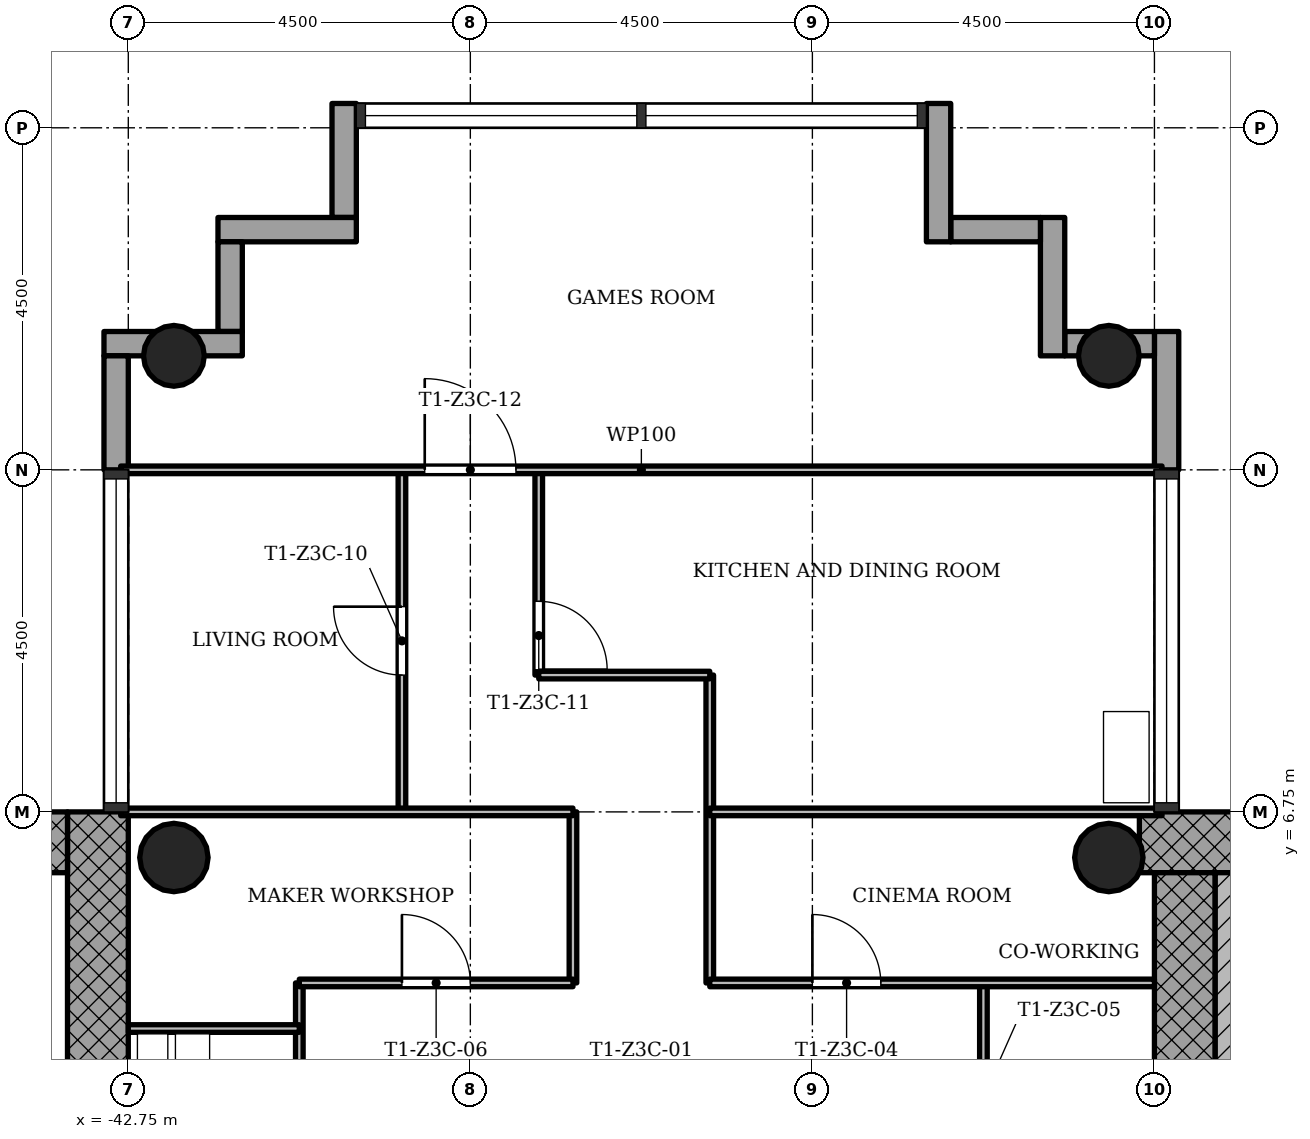
"""IFC4 building model, lengths in metres.
Left out: names, types, materials, properties, quantities, classifications, styles, units other than length and angle.
Written with IfcOpenShell. Run it as: python <this file> out.ifc"""

import sys

from ifc_helpers import new_model, si_unit, direction, frame, frame_2d, origin, origin_2d, place, context, subcontext, project, spatial, rectangle, hollow_circle, extrude, element, fill, save


model = new_model("IFC4")
c1 = context("Model", 3, precision=1e-05, world=origin(), true_north=direction((0.0, 1.0)))
c2 = subcontext(c1, "Body", "Model", "MODEL_VIEW")
j1 = project(units=[si_unit("LENGTHUNIT", "METRE"), si_unit("PLANEANGLEUNIT", "RADIAN")], contexts=[c1])
p1 = place(None, origin())
s1 = spatial("IfcSite", under=j1, at=p1, CompositionType="ELEMENT")
p2 = place(p1, origin())
s2 = spatial("IfcBuilding", under=s1, at=p2, CompositionType="ELEMENT")
p3 = place(p2, frame((0.0, 0.0, 160.9)))
s3 = spatial("IfcBuildingStorey", under=s2, at=p3, CompositionType="ELEMENT", Elevation=160.9)
p4 = place(p3, frame((-20.652, 6.35, 0.0), z_axis=(0.0, 0.0, 1.0), x_axis=(-1.0, 0.0, 0.0)))
e1 = element("IfcWall", 1, at=p4, inside=s3, PredefinedType="SHEAR", context=c2, shape_type="SweptSolid", body=[
    extrude(rectangle(XDim=8.796, YDim=0.8, at=frame_2d((4.398, 0.0))), origin(), (0.0, 0.0, 1.0), 3.4),
])
p5 = place(p3, frame((-28.85, 5.95, 0.0), z_axis=(0.0, 0.0, 1.0), x_axis=(0.0, -1.0, 0.0)))
e2 = element("IfcWall", 2, at=p5, inside=s3, PredefinedType="SHEAR", context=c2, shape_type="SweptSolid", body=[
    extrude(rectangle(XDim=12.7, YDim=0.8, at=frame_2d((6.35, 0.0))), origin(), (0.0, 0.0, 1.0), 3.4),
])
p6 = place(p5, frame((5.05, 0.0, 0.0)))
e3 = element("IfcOpeningElement", 3, at=p6, cuts=e2, PredefinedType="OPENING", context=c2, shape_type="SweptSolid", body=[
    extrude(rectangle(XDim=1.8, YDim=2.1, at=frame_2d((0.9, 1.05))), frame((0.0, 0.41, 0.0), z_axis=(0.0, -1.0, 0.0), x_axis=(1.0, 0.0, 0.0)), (0.0, 0.0, 1.0), 0.82),
])
p7 = place(p3, frame((-43.15, -5.95, 0.0), z_axis=(0.0, 0.0, 1.0), x_axis=(0.0, 1.0, 0.0)))
e4 = element("IfcWall", 4, at=p7, inside=s3, PredefinedType="SHEAR", context=c2, shape_type="SweptSolid", body=[
    extrude(rectangle(XDim=12.7, YDim=0.8, at=frame_2d((6.35, 0.0))), origin(), (0.0, 0.0, 1.0), 3.4),
])
p8 = place(p7, frame((5.05, 0.0, 0.0)))
e5 = element("IfcOpeningElement", 5, at=p8, cuts=e4, PredefinedType="OPENING", context=c2, shape_type="SweptSolid", body=[
    extrude(rectangle(XDim=1.8, YDim=2.1, at=frame_2d((0.9, 1.05))), frame((0.0, 0.41, 0.0), z_axis=(0.0, -1.0, 0.0), x_axis=(1.0, 0.0, 0.0)), (0.0, 0.0, 1.0), 0.82),
])
p9 = place(p3, frame((-43.55, 6.35, 0.0), z_axis=(0.0, 0.0, 1.0), x_axis=(-1.0, 0.0, 0.0)))
e6 = element("IfcWall", 6, at=p9, inside=s3, PredefinedType="SHEAR", context=c2, shape_type="SweptSolid", body=[
    extrude(rectangle(XDim=8.2, YDim=0.8, at=frame_2d((4.1, 0.0))), origin(), (0.0, 0.0, 1.0), 3.4),
])
for number, where, z_axis, x_axis in (
    (7, (-29.85, 12.75, 0.0), (0.0, 0.0, 1.0), (1.0, 0.0, 0.0)),
    (8, (-42.15, 12.75, 0.0), (0.0, 0.0, 1.0), (1.0, 0.0, 0.0)),
):
    element("IfcColumn", number, at=place(p3, frame(where, z_axis=z_axis, x_axis=x_axis)), inside=s3, PredefinedType="COLUMN", context=c2, shape_type="SweptSolid", body=[
        extrude(hollow_circle(Radius=0.4, WallThickness=0.028, at=origin_2d()), origin(), (0.0, 0.0, 1.0), 3.4),
    ])
for number, where, z_axis, x_axis in (
    (9, (-29.85, 6.15, 0.0), (0.0, 0.0, 1.0), (1.0, 0.0, 0.0)),
    (10, (-42.15, 6.15, 0.0), (0.0, 0.0, 1.0), (1.0, 0.0, 0.0)),
):
    element("IfcColumn", number, at=place(p3, frame(where, z_axis=z_axis, x_axis=x_axis)), inside=s3, PredefinedType="COLUMN", context=c2, shape_type="SweptSolid", body=[
        extrude(hollow_circle(Radius=0.45, WallThickness=0.032, at=origin_2d()), origin(), (0.0, 0.0, 1.0), 3.4),
    ])
p10 = place(p3, frame((-29.09, 11.25, -0.3), z_axis=(0.0, 0.0, 1.0), x_axis=(0.0, 1.0, 0.0)))
e11 = element("IfcWall", 11, at=p10, inside=s3, PredefinedType="STANDARD", context=c2, shape_type="SweptSolid", body=[
    extrude(rectangle(XDim=1.82, YDim=0.32, at=frame_2d((0.91, 0.0))), origin(), (0.0, 0.0, 1.0), 3.4),
])
p11 = place(p3, frame((-29.25, 12.91, -0.3), z_axis=(0.0, 0.0, 1.0), x_axis=(-1.0, 0.0, 0.0)))
e12 = element("IfcWall", 12, at=p11, inside=s3, PredefinedType="STANDARD", context=c2, shape_type="SweptSolid", body=[
    extrude(rectangle(XDim=1.18, YDim=0.32, at=frame_2d((0.59, 0.0))), origin(), (0.0, 0.0, 1.0), 3.4),
])
p12 = place(p3, frame((-30.59, 12.75, -0.3), z_axis=(0.0, 0.0, 1.0), x_axis=(0.0, 1.0, 0.0)))
e13 = element("IfcWall", 13, at=p12, inside=s3, PredefinedType="STANDARD", context=c2, shape_type="SweptSolid", body=[
    extrude(rectangle(XDim=1.82, YDim=0.32, at=frame_2d((0.91, 0.0))), origin(), (0.0, 0.0, 1.0), 3.4),
])
p13 = place(p3, frame((-30.75, 14.41, -0.3), z_axis=(0.0, 0.0, 1.0), x_axis=(-1.0, 0.0, 0.0)))
e14 = element("IfcWall", 14, at=p13, inside=s3, PredefinedType="STANDARD", context=c2, shape_type="SweptSolid", body=[
    extrude(rectangle(XDim=1.18, YDim=0.32, at=frame_2d((0.59, 0.0))), origin(), (0.0, 0.0, 1.0), 3.4),
])
p14 = place(p3, frame((-32.09, 14.25, -0.3), z_axis=(0.0, 0.0, 1.0), x_axis=(0.0, 1.0, 0.0)))
e15 = element("IfcWall", 15, at=p14, inside=s3, PredefinedType="STANDARD", context=c2, shape_type="SweptSolid", body=[
    extrude(rectangle(XDim=1.82, YDim=0.32, at=frame_2d((0.91, 0.0))), origin(), (0.0, 0.0, 1.0), 3.4),
])
p15 = place(p3, frame((-39.91, 16.07, -0.3), z_axis=(0.0, 0.0, 1.0), x_axis=(0.0, -1.0, 0.0)))
e16 = element("IfcWall", 16, at=p15, inside=s3, PredefinedType="STANDARD", context=c2, shape_type="SweptSolid", body=[
    extrude(rectangle(XDim=1.5, YDim=0.32, at=frame_2d((0.75, 0.0))), origin(), (0.0, 0.0, 1.0), 3.4),
])
p16 = place(p3, frame((-39.75, 14.41, -0.3), z_axis=(0.0, 0.0, 1.0), x_axis=(-1.0, 0.0, 0.0)))
e17 = element("IfcWall", 17, at=p16, inside=s3, PredefinedType="STANDARD", context=c2, shape_type="SweptSolid", body=[
    extrude(rectangle(XDim=1.82, YDim=0.32, at=frame_2d((0.91, 0.0))), origin(), (0.0, 0.0, 1.0), 3.4),
])
p17 = place(p3, frame((-41.41, 14.25, -0.3), z_axis=(0.0, 0.0, 1.0), x_axis=(0.0, -1.0, 0.0)))
e18 = element("IfcWall", 18, at=p17, inside=s3, PredefinedType="STANDARD", context=c2, shape_type="SweptSolid", body=[
    extrude(rectangle(XDim=1.18, YDim=0.32, at=frame_2d((0.59, 0.0))), origin(), (0.0, 0.0, 1.0), 3.4),
])
p18 = place(p3, frame((-41.25, 12.91, -0.3), z_axis=(0.0, 0.0, 1.0), x_axis=(-1.0, 0.0, 0.0)))
e19 = element("IfcWall", 19, at=p18, inside=s3, PredefinedType="STANDARD", context=c2, shape_type="SweptSolid", body=[
    extrude(rectangle(XDim=1.82, YDim=0.32, at=frame_2d((0.91, 0.0))), origin(), (0.0, 0.0, 1.0), 3.4),
])
p19 = place(p3, frame((-42.91, 12.75, -0.3), z_axis=(0.0, 0.0, 1.0), x_axis=(0.0, -1.0, 0.0)))
e20 = element("IfcWall", 20, at=p19, inside=s3, PredefinedType="STANDARD", context=c2, shape_type="SweptSolid", body=[
    extrude(rectangle(XDim=1.5, YDim=0.32, at=frame_2d((0.75, 0.0))), origin(), (0.0, 0.0, 1.0), 3.4),
])
p20 = place(p3, frame((-40.5, 1.5, 0.0), z_axis=(0.0, 0.0, 1.0), x_axis=(0.0, 1.0, 0.0)))
e21 = element("IfcWall", 21, at=p20, inside=s3, PredefinedType="PARTITIONING", context=c2, shape_type="SweptSolid", body=[
    extrude(rectangle(XDim=3.0, YDim=0.1, at=frame_2d((1.5, 0.0))), origin(), (0.0, 0.0, 1.0), 3.0),
])
p21 = place(p3, frame((-39.15, 6.75, 0.0), z_axis=(0.0, 0.0, 1.0), x_axis=(0.0, 1.0, 0.0)))
e22 = element("IfcWall", 22, at=p21, inside=s3, PredefinedType="PARTITIONING", context=c2, shape_type="SweptSolid", body=[
    extrude(rectangle(XDim=4.5, YDim=0.1, at=frame_2d((2.25, 0.0))), origin(), (0.0, 0.0, 1.0), 3.0),
])
p22 = place(p21, frame((1.8, 0.0, 0.0)))
e23 = element("IfcOpeningElement", 23, at=p22, cuts=e22, PredefinedType="OPENING", context=c2, shape_type="SweptSolid", body=[
    extrude(rectangle(XDim=0.9, YDim=2.1, at=frame_2d((0.45, 1.05))), frame((0.0, 0.06, 0.0), z_axis=(0.0, -1.0, 0.0), x_axis=(1.0, 0.0, 0.0)), (0.0, 0.0, 1.0), 0.12),
])
p23 = place(p3, frame((-37.35, 8.55, 0.0), z_axis=(0.0, 0.0, 1.0), x_axis=(0.0, 1.0, 0.0)))
e24 = element("IfcWall", 24, at=p23, inside=s3, PredefinedType="PARTITIONING", context=c2, shape_type="SweptSolid", body=[
    extrude(rectangle(XDim=2.7, YDim=0.1, at=frame_2d((1.35, 0.0))), origin(), (0.0, 0.0, 1.0), 3.0),
])
p24 = place(p23, frame((0.07, 0.0, 0.0)))
e25 = element("IfcOpeningElement", 25, at=p24, cuts=e24, PredefinedType="OPENING", context=c2, shape_type="SweptSolid", body=[
    extrude(rectangle(XDim=0.9, YDim=2.1, at=frame_2d((0.45, 1.05))), frame((0.0, 0.06, 0.0), z_axis=(0.0, -1.0, 0.0), x_axis=(1.0, 0.0, 0.0)), (0.0, 0.0, 1.0), 0.12),
])
p25 = place(p3, frame((-36.9, 4.5, 0.0), z_axis=(0.0, 0.0, 1.0), x_axis=(0.0, 1.0, 0.0)))
e26 = element("IfcWall", 26, at=p25, inside=s3, PredefinedType="PARTITIONING", context=c2, shape_type="SweptSolid", body=[
    extrude(rectangle(XDim=2.25, YDim=0.1, at=frame_2d((1.125, 0.0))), origin(), (0.0, 0.0, 1.0), 3.0),
])
p26 = place(p3, frame((-35.1, 4.5, 0.0), z_axis=(0.0, 0.0, 1.0), x_axis=(0.0, 1.0, 0.0)))
e27 = element("IfcWall", 27, at=p26, inside=s3, PredefinedType="PARTITIONING", context=c2, shape_type="SweptSolid", body=[
    extrude(rectangle(XDim=4.05, YDim=0.1, at=frame_2d((2.025, 0.0))), origin(), (0.0, 0.0, 1.0), 3.0),
])
p27 = place(p3, frame((-31.5, 1.5, 0.0), z_axis=(0.0, 0.0, 1.0), x_axis=(0.0, 1.0, 0.0)))
e28 = element("IfcWall", 28, at=p27, inside=s3, PredefinedType="PARTITIONING", context=c2, shape_type="SweptSolid", body=[
    extrude(rectangle(XDim=3.0, YDim=0.1, at=frame_2d((1.5, 0.0))), origin(), (0.0, 0.0, 1.0), 3.0),
])
p28 = place(p27, frame((1.05, 0.0, 0.0)))
e29 = element("IfcOpeningElement", 29, at=p28, cuts=e28, PredefinedType="OPENING", context=c2, shape_type="SweptSolid", body=[
    extrude(rectangle(XDim=0.9, YDim=2.1, at=frame_2d((0.45, 1.05))), frame((0.0, 0.06, 0.0), z_axis=(0.0, -1.0, 0.0), x_axis=(1.0, 0.0, 0.0)), (0.0, 0.0, 1.0), 0.12),
])
p29 = place(p3, frame((-42.75, 3.9, 0.0), z_axis=(0.0, 0.0, 1.0), x_axis=(1.0, 0.0, 0.0)))
e30 = element("IfcWall", 30, at=p29, inside=s3, PredefinedType="PARTITIONING", context=c2, shape_type="SweptSolid", body=[
    extrude(rectangle(XDim=2.25, YDim=0.1, at=frame_2d((1.125, 0.0))), origin(), (0.0, 0.0, 1.0), 3.0),
])
p30 = place(p3, frame((-40.5, 4.5, 0.0), z_axis=(0.0, 0.0, 1.0), x_axis=(1.0, 0.0, 0.0)))
e31 = element("IfcWall", 31, at=p30, inside=s3, PredefinedType="PARTITIONING", context=c2, shape_type="SweptSolid", body=[
    extrude(rectangle(XDim=3.6, YDim=0.1, at=frame_2d((1.8, 0.0))), origin(), (0.0, 0.0, 1.0), 3.0),
])
p31 = place(p30, frame((1.35, 0.0, 0.0)))
e32 = element("IfcOpeningElement", 32, at=p31, cuts=e31, PredefinedType="OPENING", context=c2, shape_type="SweptSolid", body=[
    extrude(rectangle(XDim=0.9, YDim=2.1, at=frame_2d((0.45, 1.05))), frame((0.0, 0.06, 0.0), z_axis=(0.0, -1.0, 0.0), x_axis=(1.0, 0.0, 0.0)), (0.0, 0.0, 1.0), 0.12),
])
p32 = place(p3, frame((-35.1, 4.5, 0.0), z_axis=(0.0, 0.0, 1.0), x_axis=(1.0, 0.0, 0.0)))
e33 = element("IfcWall", 33, at=p32, inside=s3, PredefinedType="PARTITIONING", context=c2, shape_type="SweptSolid", body=[
    extrude(rectangle(XDim=5.85, YDim=0.1, at=frame_2d((2.925, 0.0))), origin(), (0.0, 0.0, 1.0), 3.0),
])
p33 = place(p32, frame((1.35, 0.0, 0.0)))
e34 = element("IfcOpeningElement", 34, at=p33, cuts=e33, PredefinedType="OPENING", context=c2, shape_type="SweptSolid", body=[
    extrude(rectangle(XDim=0.9, YDim=2.1, at=frame_2d((0.45, 1.05))), frame((0.0, 0.06, 0.0), z_axis=(0.0, -1.0, 0.0), x_axis=(1.0, 0.0, 0.0)), (0.0, 0.0, 1.0), 0.12),
])
for number, where, z_axis, x_axis in (
    (35, (-42.85, 6.75, 0.0), (0.0, 0.0, 1.0), (1.0, 0.0, 0.0)),
    (36, (-35.1, 6.75, 0.0), (0.0, 0.0, 1.0), (1.0, 0.0, 0.0)),
):
    element("IfcWall", number, at=place(p3, frame(where, z_axis=z_axis, x_axis=x_axis)), inside=s3, PredefinedType="PARTITIONING", context=c2, shape_type="SweptSolid", body=[
        extrude(rectangle(XDim=5.95, YDim=0.1, at=frame_2d((2.975, 0.0))), origin(), (0.0, 0.0, 1.0), 3.0),
    ])
p34 = place(p3, frame((-37.35, 8.55, 0.0), z_axis=(0.0, 0.0, 1.0), x_axis=(1.0, 0.0, 0.0)))
e37 = element("IfcWall", 37, at=p34, inside=s3, PredefinedType="PARTITIONING", context=c2, shape_type="SweptSolid", body=[
    extrude(rectangle(XDim=2.25, YDim=0.1, at=frame_2d((1.125, 0.0))), origin(), (0.0, 0.0, 1.0), 3.0),
])
p35 = place(p3, frame((-42.85, 11.25, 0.0), z_axis=(0.0, 0.0, 1.0), x_axis=(1.0, 0.0, 0.0)))
e38 = element("IfcWall", 38, at=p35, inside=s3, PredefinedType="PARTITIONING", context=c2, shape_type="SweptSolid", body=[
    extrude(rectangle(XDim=13.7, YDim=0.1, at=frame_2d((6.85, 0.0))), origin(), (0.0, 0.0, 1.0), 3.0),
])
p36 = place(p35, frame((4.0, 0.0, 0.0)))
e39 = element("IfcOpeningElement", 39, at=p36, cuts=e38, PredefinedType="OPENING", context=c2, shape_type="SweptSolid", body=[
    extrude(rectangle(XDim=1.2, YDim=2.1, at=frame_2d((0.6, 1.05))), frame((0.0, 0.06, 0.0), z_axis=(0.0, -1.0, 0.0), x_axis=(1.0, 0.0, 0.0)), (0.0, 0.0, 1.0), 0.12),
])
p37 = place(p3, frame((-28.25, 1.85, 0.0), z_axis=(0.0, 0.0, 1.0), x_axis=(0.0, 1.0, 0.0)))
e40 = element("IfcWall", 40, at=p37, inside=s3, PredefinedType="SHEAR", context=c2, shape_type="SweptSolid", body=[
    extrude(rectangle(XDim=4.1, YDim=0.4, at=frame_2d((2.05, 0.0))), origin(), (0.0, 0.0, 1.0), 3.4),
])
p38 = place(p33, origin())
e41 = element("IfcDoor", 41, at=p38, inside=s3, OperationType="SINGLE_SWING_RIGHT", PredefinedType="DOOR", context=c2, shape_type="SweptSolid", body=[
    extrude(rectangle(XDim=0.9, YDim=2.1, at=frame_2d((0.45, 1.05))), frame((0.0, 0.025, 0.0), z_axis=(0.0, -1.0, 0.0), x_axis=(1.0, 0.0, 0.0)), (0.0, 0.0, 1.0), 0.05),
])
fill(e34, e41)
p39 = place(p31, origin())
e42 = element("IfcDoor", 42, at=p39, inside=s3, OperationType="SINGLE_SWING_RIGHT", PredefinedType="DOOR", context=c2, shape_type="SweptSolid", body=[
    extrude(rectangle(XDim=0.9, YDim=2.1, at=frame_2d((0.45, 1.05))), frame((0.0, 0.025, 0.0), z_axis=(0.0, -1.0, 0.0), x_axis=(1.0, 0.0, 0.0)), (0.0, 0.0, 1.0), 0.05),
])
fill(e32, e42)
p40 = place(p22, origin())
e43 = element("IfcDoor", 43, at=p40, inside=s3, OperationType="SINGLE_SWING_LEFT", PredefinedType="DOOR", context=c2, shape_type="SweptSolid", body=[
    extrude(rectangle(XDim=0.9, YDim=2.1, at=frame_2d((0.45, 1.05))), frame((0.0, 0.025, 0.0), z_axis=(0.0, -1.0, 0.0), x_axis=(1.0, 0.0, 0.0)), (0.0, 0.0, 1.0), 0.05),
])
fill(e23, e43)
p41 = place(p24, origin())
e44 = element("IfcDoor", 44, at=p41, inside=s3, OperationType="SINGLE_SWING_LEFT", PredefinedType="DOOR", context=c2, shape_type="SweptSolid", body=[
    extrude(rectangle(XDim=0.9, YDim=2.1, at=frame_2d((0.45, 1.05))), frame((0.0, 0.025, 0.0), z_axis=(0.0, -1.0, 0.0), x_axis=(1.0, 0.0, 0.0)), (0.0, 0.0, 1.0), 0.05),
])
fill(e25, e44)
p42 = place(p36, origin())
e45 = element("IfcDoor", 45, at=p42, inside=s3, OperationType="SINGLE_SWING_RIGHT", PredefinedType="DOOR", context=c2, shape_type="SweptSolid", body=[
    extrude(rectangle(XDim=1.2, YDim=2.1, at=frame_2d((0.6, 1.05))), frame((0.0, 0.025, 0.0), z_axis=(0.0, -1.0, 0.0), x_axis=(1.0, 0.0, 0.0)), (0.0, 0.0, 1.0), 0.05),
])
fill(e39, e45)
save(model, sys.argv[1])
